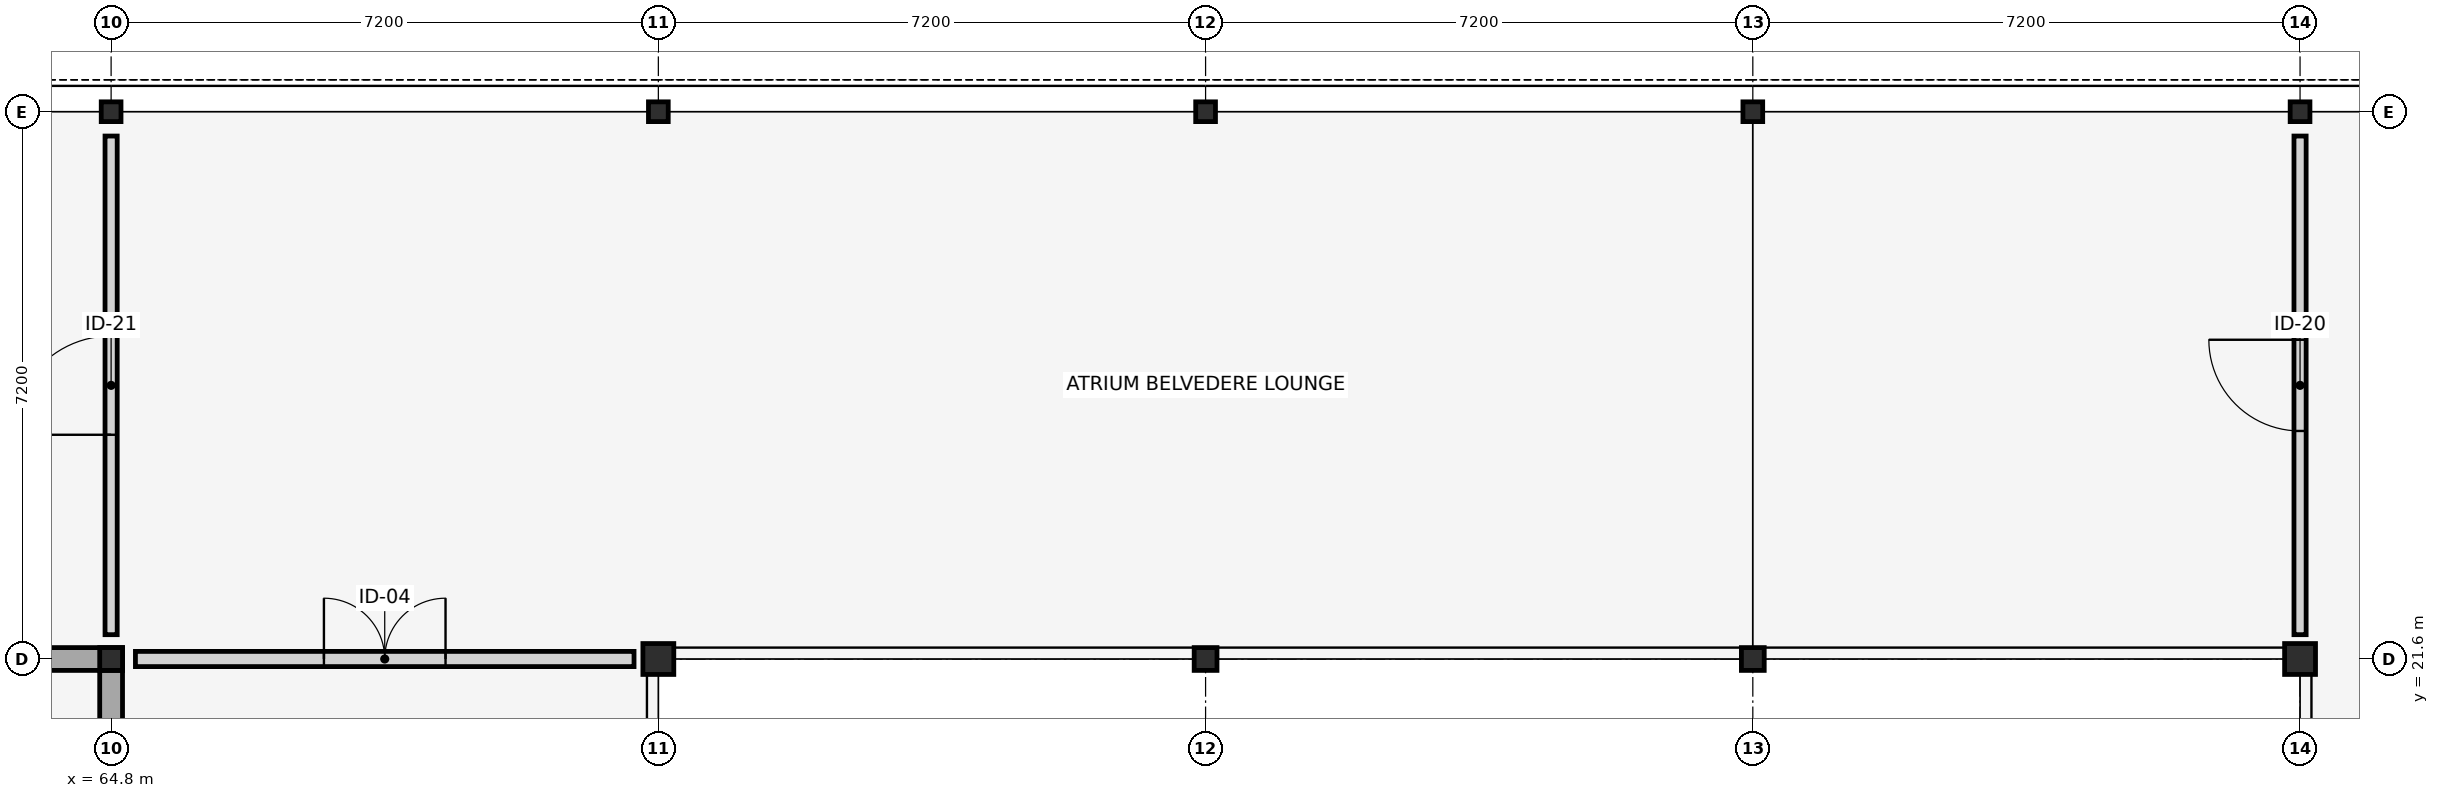
"""IFC4 building model, lengths in metres.
Left out: names, types, materials, properties, quantities, classifications, styles, units other than length and angle.
Written with IfcOpenShell. Run it as: python <this file> out.ifc"""

import sys

from ifc_helpers import new_model, si_unit, direction, frame, frame_2d, origin, origin_2d, place, context, subcontext, project, spatial, rectangle, hollow_circle, i_section, extrude, element, fill, save


model = new_model("IFC4")
c1 = context("Model", 3, precision=1e-05, world=origin(), true_north=direction((0.0, 1.0)))
c2 = subcontext(c1, "Body", "Model", "MODEL_VIEW")
j1 = project(units=[si_unit("LENGTHUNIT", "METRE"), si_unit("PLANEANGLEUNIT", "RADIAN")], contexts=[c1])
p1 = place(None, origin())
s1 = spatial("IfcSite", under=j1, at=p1, CompositionType="ELEMENT")
p2 = place(p1, origin())
s2 = spatial("IfcBuilding", under=s1, at=p2, CompositionType="ELEMENT")
p3 = place(p2, frame((0.0, 0.0, 17.1)))
s3 = spatial("IfcBuildingStorey", under=s2, at=p3, CompositionType="ELEMENT", Elevation=17.1)
p4 = place(p3, frame((64.8, 21.6, 0.0), z_axis=(0.0, 0.0, 1.0), x_axis=(1.0, 0.0, 0.0)))
e1 = element("IfcColumn", 1, at=p4, inside=s3, PredefinedType="COLUMN", context=c2, shape_type="SweptSolid", body=[
    extrude(i_section(OverallWidth=0.3, OverallDepth=0.3, WebThickness=0.011, FlangeThickness=0.019, FilletRadius=0.027, at=origin_2d()), origin(), (0.0, 0.0, 1.0), 8.1),
])
p5 = place(p3, frame((64.8, 28.8, 0.0), z_axis=(0.0, 0.0, 1.0), x_axis=(0.0, 1.0, 0.0)))
e2 = element("IfcColumn", 2, at=p5, inside=s3, PredefinedType="COLUMN", context=c2, shape_type="SweptSolid", body=[
    extrude(i_section(OverallWidth=0.26, OverallDepth=0.26, WebThickness=0.01, FlangeThickness=0.018, FilletRadius=0.024, at=origin_2d()), origin(), (0.0, 0.0, 1.0), 8.1),
])
p6 = place(p3, frame((72.0, 21.6, 0.0), z_axis=(0.0, 0.0, 1.0), x_axis=(0.0, 1.0, 0.0)))
e3 = element("IfcColumn", 3, at=p6, inside=s3, PredefinedType="COLUMN", context=c2, shape_type="SweptSolid", body=[
    extrude(hollow_circle(Radius=0.203, WallThickness=0.016, at=origin_2d()), origin(), (0.0, 0.0, 1.0), 8.1),
])
p7 = place(p3, frame((72.0, 28.8, 0.0), z_axis=(0.0, 0.0, 1.0), x_axis=(1.0, 0.0, 0.0)))
e4 = element("IfcColumn", 4, at=p7, inside=s3, PredefinedType="COLUMN", context=c2, shape_type="SweptSolid", body=[
    extrude(i_section(OverallWidth=0.26, OverallDepth=0.26, WebThickness=0.01, FlangeThickness=0.018, FilletRadius=0.024, at=origin_2d()), origin(), (0.0, 0.0, 1.0), 8.1),
])
p8 = place(p3, frame((79.2, 21.6, 0.0), z_axis=(0.0, 0.0, 1.0), x_axis=(1.0, 0.0, 0.0)))
e5 = element("IfcColumn", 5, at=p8, inside=s3, PredefinedType="COLUMN", context=c2, shape_type="SweptSolid", body=[
    extrude(i_section(OverallWidth=0.3, OverallDepth=0.3, WebThickness=0.011, FlangeThickness=0.019, FilletRadius=0.027, at=origin_2d()), origin(), (0.0, 0.0, 1.0), 8.1),
])
p9 = place(p3, frame((79.2, 28.8, 0.0), z_axis=(0.0, 0.0, 1.0), x_axis=(0.0, 1.0, 0.0)))
e6 = element("IfcColumn", 6, at=p9, inside=s3, PredefinedType="COLUMN", context=c2, shape_type="SweptSolid", body=[
    extrude(i_section(OverallWidth=0.26, OverallDepth=0.26, WebThickness=0.01, FlangeThickness=0.018, FilletRadius=0.024, at=origin_2d()), origin(), (0.0, 0.0, 1.0), 8.1),
])
p10 = place(p3, frame((86.4, 21.6, 0.0), z_axis=(0.0, 0.0, 1.0), x_axis=(0.0, 1.0, 0.0)))
e7 = element("IfcColumn", 7, at=p10, inside=s3, PredefinedType="COLUMN", context=c2, shape_type="SweptSolid", body=[
    extrude(i_section(OverallWidth=0.3, OverallDepth=0.3, WebThickness=0.011, FlangeThickness=0.019, FilletRadius=0.027, at=origin_2d()), origin(), (0.0, 0.0, 1.0), 8.1),
])
p11 = place(p3, frame((86.4, 28.8, 0.0), z_axis=(0.0, 0.0, 1.0), x_axis=(1.0, 0.0, 0.0)))
e8 = element("IfcColumn", 8, at=p11, inside=s3, PredefinedType="COLUMN", context=c2, shape_type="SweptSolid", body=[
    extrude(i_section(OverallWidth=0.26, OverallDepth=0.26, WebThickness=0.01, FlangeThickness=0.018, FilletRadius=0.024, at=origin_2d()), origin(), (0.0, 0.0, 1.0), 8.1),
])
p12 = place(p3, frame((93.6, 21.6, 0.0), z_axis=(0.0, 0.0, 1.0), x_axis=(1.0, 0.0, 0.0)))
e9 = element("IfcColumn", 9, at=p12, inside=s3, PredefinedType="COLUMN", context=c2, shape_type="SweptSolid", body=[
    extrude(hollow_circle(Radius=0.203, WallThickness=0.016, at=origin_2d()), origin(), (0.0, 0.0, 1.0), 8.1),
])
p13 = place(p3, frame((93.6, 28.8, 0.0), z_axis=(0.0, 0.0, 1.0), x_axis=(0.0, 1.0, 0.0)))
e10 = element("IfcColumn", 10, at=p13, inside=s3, PredefinedType="COLUMN", context=c2, shape_type="SweptSolid", body=[
    extrude(i_section(OverallWidth=0.26, OverallDepth=0.26, WebThickness=0.01, FlangeThickness=0.018, FilletRadius=0.024, at=origin_2d()), origin(), (0.0, 0.0, 1.0), 8.1),
])
p14 = place(p3, frame((57.6, 21.6, 0.0), z_axis=(0.0, 0.0, 1.0), x_axis=(1.0, 0.0, 0.0)))
e11 = element("IfcWall", 11, at=p14, inside=s3, PredefinedType="SHEAR", context=c2, shape_type="SweptSolid", body=[
    extrude(rectangle(XDim=7.35, YDim=0.3, at=frame_2d((3.675, 0.0))), origin(), (0.0, 0.0, 1.0), 7.88),
])
p15 = place(p3, frame((64.8, 7.35, 0.0), z_axis=(0.0, 0.0, 1.0), x_axis=(0.0, 1.0, 0.0)))
e12 = element("IfcWall", 12, at=p15, inside=s3, PredefinedType="SHEAR", context=c2, shape_type="SweptSolid", body=[
    extrude(rectangle(XDim=14.1, YDim=0.3, at=frame_2d((7.05, 0.0))), origin(), (0.0, 0.0, 1.0), 7.88),
])
p16 = place(p15, frame((3.55, 0.0, 0.0)))
e13 = element("IfcOpeningElement", 13, at=p16, cuts=e12, PredefinedType="OPENING", context=c2, shape_type="SweptSolid", body=[
    extrude(rectangle(XDim=1.3, YDim=2.2, at=frame_2d((0.65, 1.1))), frame((0.0, 0.16, 0.0), z_axis=(0.0, -1.0, 0.0), x_axis=(1.0, 0.0, 0.0)), (0.0, 0.0, 1.0), 0.32),
])
p17 = place(p15, frame((7.85, 0.0, 0.0)))
e14 = element("IfcOpeningElement", 14, at=p17, cuts=e12, PredefinedType="OPENING", context=c2, shape_type="SweptSolid", body=[
    extrude(rectangle(XDim=1.05, YDim=2.15, at=frame_2d((0.525, 1.075))), frame((0.0, 0.16, 0.0), z_axis=(0.0, -1.0, 0.0), x_axis=(1.0, 0.0, 0.0)), (0.0, 0.0, 1.0), 0.32),
])
p18 = place(p15, frame((10.55, 0.0, 0.0)))
e15 = element("IfcOpeningElement", 15, at=p18, cuts=e12, PredefinedType="OPENING", context=c2, shape_type="SweptSolid", body=[
    extrude(rectangle(XDim=1.0, YDim=2.15, at=frame_2d((0.5, 1.075))), frame((0.0, 0.16, 0.0), z_axis=(0.0, -1.0, 0.0), x_axis=(1.0, 0.0, 0.0)), (0.0, 0.0, 1.0), 0.32),
])
p19 = place(p3, frame((65.12, 21.6, 0.0), z_axis=(0.0, 0.0, 1.0), x_axis=(1.0, 0.0, 0.0)))
e16 = element("IfcWall", 16, at=p19, inside=s3, PredefinedType="PARTITIONING", context=c2, shape_type="SweptSolid", body=[
    extrude(rectangle(XDim=6.56, YDim=0.2, at=frame_2d((3.28, 0.0))), origin(), (0.0, 0.0, 1.0), 7.05),
])
p20 = place(p19, frame((2.48, 0.0, 0.0)))
e17 = element("IfcOpeningElement", 17, at=p20, cuts=e16, PredefinedType="OPENING", context=c2, shape_type="SweptSolid", body=[
    extrude(rectangle(XDim=1.6, YDim=2.35, at=frame_2d((0.8, 1.175))), frame((0.0, 0.11, 0.0), z_axis=(0.0, -1.0, 0.0), x_axis=(1.0, 0.0, 0.0)), (0.0, 0.0, 1.0), 0.22),
])
p21 = place(p3, frame((93.6, 21.92, 0.0), z_axis=(0.0, 0.0, 1.0), x_axis=(0.0, 1.0, 0.0)))
e18 = element("IfcWall", 18, at=p21, inside=s3, PredefinedType="PARTITIONING", context=c2, shape_type="SweptSolid", body=[
    extrude(rectangle(XDim=6.56, YDim=0.16, at=frame_2d((3.28, 0.0))), origin(), (0.0, 0.0, 1.0), 7.05),
])
p22 = place(p21, frame((2.68, 0.0, 0.0)))
e19 = element("IfcOpeningElement", 19, at=p22, cuts=e18, PredefinedType="OPENING", context=c2, shape_type="SweptSolid", body=[
    extrude(rectangle(XDim=1.2, YDim=2.4, at=frame_2d((0.6, 1.2))), frame((0.0, 0.09, 0.0), z_axis=(0.0, -1.0, 0.0), x_axis=(1.0, 0.0, 0.0)), (0.0, 0.0, 1.0), 0.18),
])
p23 = place(p3, frame((64.8, 21.92, 0.0), z_axis=(0.0, 0.0, 1.0), x_axis=(0.0, 1.0, 0.0)))
e20 = element("IfcWall", 20, at=p23, inside=s3, PredefinedType="PARTITIONING", context=c2, shape_type="SweptSolid", body=[
    extrude(rectangle(XDim=6.56, YDim=0.16, at=frame_2d((3.28, 0.0))), origin(), (0.0, 0.0, 1.0), 7.05),
])
p24 = place(p23, frame((2.63, 0.0, 0.0)))
e21 = element("IfcOpeningElement", 21, at=p24, cuts=e20, PredefinedType="OPENING", context=c2, shape_type="SweptSolid", body=[
    extrude(rectangle(XDim=1.3, YDim=2.45, at=frame_2d((0.65, 1.225))), frame((0.0, 0.09, 0.0), z_axis=(0.0, -1.0, 0.0), x_axis=(1.0, 0.0, 0.0)), (0.0, 0.0, 1.0), 0.18),
])
p25 = place(p20, origin())
e22 = element("IfcDoor", 22, at=p25, inside=s3, OperationType="DOUBLE_DOOR_SINGLE_SWING", PredefinedType="DOOR", context=c2, shape_type="SweptSolid", body=[
    extrude(rectangle(XDim=1.6, YDim=2.35, at=frame_2d((0.8, 1.175))), frame((0.0, 0.025, 0.0), z_axis=(0.0, -1.0, 0.0), x_axis=(1.0, 0.0, 0.0)), (0.0, 0.0, 1.0), 0.05),
])
fill(e17, e22)
p26 = place(p22, origin())
e23 = element("IfcDoor", 23, at=p26, inside=s3, OperationType="SINGLE_SWING_RIGHT", PredefinedType="DOOR", context=c2, shape_type="SweptSolid", body=[
    extrude(rectangle(XDim=1.2, YDim=2.4, at=frame_2d((0.6, 1.2))), frame((0.0, 0.025, 0.0), z_axis=(0.0, -1.0, 0.0), x_axis=(1.0, 0.0, 0.0)), (0.0, 0.0, 1.0), 0.05),
])
fill(e19, e23)
p27 = place(p24, origin())
e24 = element("IfcDoor", 24, at=p27, inside=s3, OperationType="SINGLE_SWING_LEFT", PredefinedType="DOOR", context=c2, shape_type="SweptSolid", body=[
    extrude(rectangle(XDim=1.3, YDim=2.45, at=frame_2d((0.65, 1.225))), frame((0.0, 0.025, 0.0), z_axis=(0.0, -1.0, 0.0), x_axis=(1.0, 0.0, 0.0)), (0.0, 0.0, 1.0), 0.05),
])
fill(e21, e24)
save(model, sys.argv[1])
